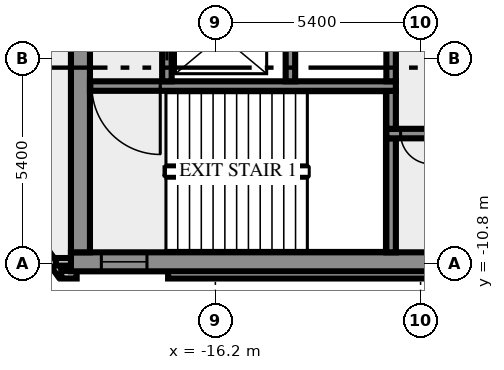
"""IFC4 building model, lengths in metres.
Left out: names, types, materials, properties, quantities, classifications, styles, units other than length and angle.
Written with IfcOpenShell. Run it as: python <this file> out.ifc"""

import sys

from ifc_helpers import new_model, si_unit, direction, frame, frame_2d, origin, place, context, subcontext, project, spatial, rectangle, extrude, element, fill, save


model = new_model("IFC4")
c1 = context("Model", 3, precision=1e-05, world=origin(), true_north=direction((0.0, 1.0)))
c2 = subcontext(c1, "Body", "Model", "MODEL_VIEW")
j1 = project(units=[si_unit("LENGTHUNIT", "METRE"), si_unit("PLANEANGLEUNIT", "RADIAN")], contexts=[c1])
p1 = place(None, origin())
s1 = spatial("IfcSite", under=j1, at=p1, CompositionType="ELEMENT")
p2 = place(p1, origin())
s2 = spatial("IfcBuilding", under=s1, at=p2, CompositionType="ELEMENT")
p3 = place(p2, frame((0.0, 0.0, 289.0)))
s3 = spatial("IfcBuildingStorey", under=s2, at=p3, CompositionType="ELEMENT", Elevation=289.0)
p4 = place(p3, frame((-21.833, -8.909, 0.0), z_axis=(0.0, 0.0, 1.0), x_axis=(0.587766567315, -0.809030569476, 0.0)))
e1 = element("IfcWall", 1, at=p4, inside=s3, PredefinedType="SOLIDWALL", context=c2, shape_type="SweptSolid", body=[
    extrude(rectangle(XDim=2.688, YDim=0.2, at=frame_2d((1.344, 0.0))), origin(), (0.0, 0.0, 1.0), 3.65),
])
p5 = place(p3, frame((-20.256, -11.088, 0.0), z_axis=(0.0, 0.0, 1.0), x_axis=(1.0, 0.0, 0.0)))
e2 = element("IfcWall", 2, at=p5, inside=s3, PredefinedType="SOLIDWALL", context=c2, shape_type="SweptSolid", body=[
    extrude(rectangle(XDim=0.406, YDim=0.2, at=frame_2d((0.203, 0.0))), origin(), (0.0, 0.0, 1.0), 3.65),
])
p6 = place(p3, frame((-17.444, -11.088, 0.0), z_axis=(0.0, 0.0, 1.0), x_axis=(1.0, 0.0, 0.0)))
e3 = element("IfcWall", 3, at=p6, inside=s3, PredefinedType="SOLIDWALL", context=c2, shape_type="SweptSolid", body=[
    extrude(rectangle(XDim=34.888, YDim=0.2, at=frame_2d((17.444, 0.0))), origin(), (0.0, 0.0, 1.0), 3.65),
])
p7 = place(p3, frame((-19.98, -10.75, 0.0), z_axis=(0.0, 0.0, 1.0), x_axis=(-1.0, 0.0, 0.0)))
e4 = element("IfcWall", 4, at=p7, inside=s3, PredefinedType="SOLIDWALL", context=c2, shape_type="SweptSolid", body=[
    extrude(rectangle(XDim=0.417, YDim=0.2, at=frame_2d((0.208, 0.0))), origin(), (0.0, 0.0, 1.0), 3.65),
])
p8 = place(p3, frame((-20.0, -10.75, 0.0), z_axis=(0.0, 0.0, 1.0), x_axis=(1.0, 0.0, 0.0)))
e5 = element("IfcWall", 5, at=p8, inside=s3, PredefinedType="SHEAR", context=c2, shape_type="SweptSolid", body=[
    extrude(rectangle(XDim=40.0, YDim=0.5, at=frame_2d((20.0, 0.0))), origin(), (0.0, 0.0, 1.0), 3.65),
])
p9 = place(p8, frame((0.8, 0.0, 1.0)))
e6 = element("IfcOpeningElement", 6, at=p9, cuts=e5, PredefinedType="OPENING", context=c2, shape_type="SweptSolid", body=[
    extrude(rectangle(XDim=1.2, YDim=1.2, at=frame_2d((0.6, 0.6))), frame((0.0, 0.26, 0.0), z_axis=(0.0, -1.0, 0.0), x_axis=(1.0, 0.0, 0.0)), (0.0, 0.0, 1.0), 0.52),
])
p10 = place(p8, frame((38.0, 0.0, 1.0)))
e7 = element("IfcOpeningElement", 7, at=p10, cuts=e5, PredefinedType="OPENING", context=c2, shape_type="SweptSolid", body=[
    extrude(rectangle(XDim=1.2, YDim=1.2, at=frame_2d((0.6, 0.6))), frame((0.0, 0.26, 0.0), z_axis=(0.0, -1.0, 0.0), x_axis=(1.0, 0.0, 0.0)), (0.0, 0.0, 1.0), 0.52),
])
p11 = place(p3, frame((-19.75, -10.5, 0.0), z_axis=(0.0, 0.0, 1.0), x_axis=(0.0, 1.0, 0.0)))
e8 = element("IfcWall", 8, at=p11, inside=s3, PredefinedType="SHEAR", context=c2, shape_type="SweptSolid", body=[
    extrude(rectangle(XDim=8.8, YDim=0.5, at=frame_2d((4.4, 0.0))), origin(), (0.0, 0.0, 1.0), 3.65),
])
p12 = place(p3, frame((-11.575, -10.5, 0.0), z_axis=(0.0, 0.0, 1.0), x_axis=(0.0, 1.0, 0.0)))
e9 = element("IfcWall", 9, at=p12, inside=s3, PredefinedType="SHEAR", context=c2, shape_type="SweptSolid", body=[
    extrude(rectangle(XDim=3.0, YDim=0.25, at=frame_2d((1.5, 0.0))), origin(), (0.0, 0.0, 1.0), 3.65),
])
p13 = place(p3, frame((11.7, -7.375, 0.0), z_axis=(0.0, 0.0, 1.0), x_axis=(-1.0, 0.0, 0.0)))
e10 = element("IfcWall", 10, at=p13, inside=s3, PredefinedType="SHEAR", context=c2, shape_type="SweptSolid", body=[
    extrude(rectangle(XDim=23.4, YDim=0.25, at=frame_2d((11.7, 0.0))), origin(), (0.0, 0.0, 1.0), 3.65),
])
p14 = place(p13, frame((22.225, 0.0, 0.0)))
e11 = element("IfcOpeningElement", 11, at=p14, cuts=e10, PredefinedType="OPENING", context=c2, shape_type="SweptSolid", body=[
    extrude(rectangle(XDim=0.8, YDim=2.1, at=frame_2d((0.4, 1.05))), frame((0.0, 0.135, 0.0), z_axis=(0.0, -1.0, 0.0), x_axis=(1.0, 0.0, 0.0)), (0.0, 0.0, 1.0), 0.27),
])
p15 = place(p13, frame((20.2, 0.0, 0.0)))
e12 = element("IfcOpeningElement", 12, at=p15, cuts=e10, PredefinedType="OPENING", context=c2, shape_type="SweptSolid", body=[
    extrude(rectangle(XDim=1.1, YDim=2.1, at=frame_2d((0.55, 1.05))), frame((0.0, 0.135, 0.0), z_axis=(0.0, -1.0, 0.0), x_axis=(1.0, 0.0, 0.0)), (0.0, 0.0, 1.0), 0.27),
])
p16 = place(p13, frame((17.7, 0.0, 0.0)))
e13 = element("IfcOpeningElement", 13, at=p16, cuts=e10, PredefinedType="OPENING", context=c2, shape_type="SweptSolid", body=[
    extrude(rectangle(XDim=1.1, YDim=2.1, at=frame_2d((0.55, 1.05))), frame((0.0, 0.135, 0.0), z_axis=(0.0, -1.0, 0.0), x_axis=(1.0, 0.0, 0.0)), (0.0, 0.0, 1.0), 0.27),
])
p17 = place(p13, frame((15.975, 0.0, 0.0)))
e14 = element("IfcOpeningElement", 14, at=p17, cuts=e10, PredefinedType="OPENING", context=c2, shape_type="SweptSolid", body=[
    extrude(rectangle(XDim=0.8, YDim=2.1, at=frame_2d((0.4, 1.05))), frame((0.0, 0.135, 0.0), z_axis=(0.0, -1.0, 0.0), x_axis=(1.0, 0.0, 0.0)), (0.0, 0.0, 1.0), 0.27),
])
p18 = place(p13, frame((14.5, 0.0, 0.0)))
e15 = element("IfcOpeningElement", 15, at=p18, cuts=e10, PredefinedType="OPENING", context=c2, shape_type="SweptSolid", body=[
    extrude(rectangle(XDim=0.9, YDim=2.1, at=frame_2d((0.45, 1.05))), frame((0.0, 0.135, 0.0), z_axis=(0.0, -1.0, 0.0), x_axis=(1.0, 0.0, 0.0)), (0.0, 0.0, 1.0), 0.27),
])
p19 = place(p13, frame((12.95, 0.0, 0.0)))
e16 = element("IfcOpeningElement", 16, at=p19, cuts=e10, PredefinedType="OPENING", context=c2, shape_type="SweptSolid", body=[
    extrude(rectangle(XDim=0.9, YDim=2.1, at=frame_2d((0.45, 1.05))), frame((0.0, 0.135, 0.0), z_axis=(0.0, -1.0, 0.0), x_axis=(1.0, 0.0, 0.0)), (0.0, 0.0, 1.0), 0.27),
])
p20 = place(p13, frame((11.475, 0.0, 0.0)))
e17 = element("IfcOpeningElement", 17, at=p20, cuts=e10, PredefinedType="OPENING", context=c2, shape_type="SweptSolid", body=[
    extrude(rectangle(XDim=0.9, YDim=2.1, at=frame_2d((0.45, 1.05))), frame((0.0, 0.135, 0.0), z_axis=(0.0, -1.0, 0.0), x_axis=(1.0, 0.0, 0.0)), (0.0, 0.0, 1.0), 0.27),
])
p21 = place(p13, frame((10.45, 0.0, 0.0)))
e18 = element("IfcOpeningElement", 18, at=p21, cuts=e10, PredefinedType="OPENING", context=c2, shape_type="SweptSolid", body=[
    extrude(rectangle(XDim=0.5, YDim=2.1, at=frame_2d((0.25, 1.05))), frame((0.0, 0.135, 0.0), z_axis=(0.0, -1.0, 0.0), x_axis=(1.0, 0.0, 0.0)), (0.0, 0.0, 1.0), 0.27),
])
p22 = place(p13, frame((7.987, 0.0, 0.0)))
e19 = element("IfcOpeningElement", 19, at=p22, cuts=e10, PredefinedType="OPENING", context=c2, shape_type="SweptSolid", body=[
    extrude(rectangle(XDim=0.9, YDim=2.1, at=frame_2d((0.45, 1.05))), frame((0.0, 0.135, 0.0), z_axis=(0.0, -1.0, 0.0), x_axis=(1.0, 0.0, 0.0)), (0.0, 0.0, 1.0), 0.27),
])
p23 = place(p13, frame((3.012, 0.0, 0.0)))
e20 = element("IfcOpeningElement", 20, at=p23, cuts=e10, PredefinedType="OPENING", context=c2, shape_type="SweptSolid", body=[
    extrude(rectangle(XDim=0.9, YDim=2.1, at=frame_2d((0.45, 1.05))), frame((0.0, 0.135, 0.0), z_axis=(0.0, -1.0, 0.0), x_axis=(1.0, 0.0, 0.0)), (0.0, 0.0, 1.0), 0.27),
])
p24 = place(p3, frame((-11.575, -7.25, 0.0), z_axis=(0.0, 0.0, 1.0), x_axis=(0.0, 1.0, 0.0)))
e21 = element("IfcWall", 21, at=p24, inside=s3, PredefinedType="SHEAR", context=c2, shape_type="SweptSolid", body=[
    extrude(rectangle(XDim=1.0, YDim=0.25, at=frame_2d((0.5, 0.0))), origin(), (0.0, 0.0, 1.0), 3.65),
])
p25 = place(p3, frame((-11.45, -6.125, 0.0), z_axis=(0.0, 0.0, 1.0), x_axis=(-1.0, 0.0, 0.0)))
e22 = element("IfcWall", 22, at=p25, inside=s3, PredefinedType="SHEAR", context=c2, shape_type="SweptSolid", body=[
    extrude(rectangle(XDim=8.05, YDim=0.25, at=frame_2d((4.025, 0.0))), origin(), (0.0, 0.0, 1.0), 3.65),
])
p26 = place(p25, frame((6.2, 0.0, 0.0)))
e23 = element("IfcOpeningElement", 23, at=p26, cuts=e22, PredefinedType="OPENING", context=c2, shape_type="SweptSolid", body=[
    extrude(rectangle(XDim=1.8, YDim=2.1, at=frame_2d((0.9, 1.05))), frame((0.0, 0.135, 0.0), z_axis=(0.0, -1.0, 0.0), x_axis=(1.0, 0.0, 0.0)), (0.0, 0.0, 1.0), 0.27),
])
p27 = place(p3, frame((-17.475, -6.0, 0.0), z_axis=(0.0, 0.0, 1.0), x_axis=(0.0, 1.0, 0.0)))
e24 = element("IfcWall", 24, at=p27, inside=s3, PredefinedType="SHEAR", context=c2, shape_type="SweptSolid", body=[
    extrude(rectangle(XDim=4.3, YDim=0.25, at=frame_2d((2.15, 0.0))), origin(), (0.0, 0.0, 1.0), 3.65),
])
p28 = place(p27, frame((0.55, 0.0, 0.0)))
e25 = element("IfcOpeningElement", 25, at=p28, cuts=e24, PredefinedType="OPENING", context=c2, shape_type="SweptSolid", body=[
    extrude(rectangle(XDim=1.3, YDim=2.1, at=frame_2d((0.65, 1.05))), frame((0.0, 0.135, 0.0), z_axis=(0.0, -1.0, 0.0), x_axis=(1.0, 0.0, 0.0)), (0.0, 0.0, 1.0), 0.27),
])
p29 = place(p3, frame((-14.225, -6.0, 0.0), z_axis=(0.0, 0.0, 1.0), x_axis=(0.0, 1.0, 0.0)))
e26 = element("IfcWall", 26, at=p29, inside=s3, PredefinedType="SHEAR", context=c2, shape_type="SweptSolid", body=[
    extrude(rectangle(XDim=4.3, YDim=0.25, at=frame_2d((2.15, 0.0))), origin(), (0.0, 0.0, 1.0), 3.65),
])
p30 = place(p3, frame((-11.575, -6.0, 0.0), z_axis=(0.0, 0.0, 1.0), x_axis=(0.0, 1.0, 0.0)))
e27 = element("IfcWall", 27, at=p30, inside=s3, PredefinedType="SHEAR", context=c2, shape_type="SweptSolid", body=[
    extrude(rectangle(XDim=1.75, YDim=0.25, at=frame_2d((0.875, 0.0))), origin(), (0.0, 0.0, 1.0), 3.65),
])
p31 = place(p9, origin())
e28 = element("IfcWindow", 28, at=p31, inside=s3, PartitioningType="SINGLE_PANEL", PredefinedType="WINDOW", context=c2, shape_type="SweptSolid", body=[
    extrude(rectangle(XDim=1.2, YDim=1.2, at=frame_2d((0.6, 0.6))), frame((0.0, 0.03, 0.0), z_axis=(0.0, -1.0, 0.0), x_axis=(1.0, 0.0, 0.0)), (0.0, 0.0, 1.0), 0.06),
])
fill(e6, e28)
p32 = place(p14, origin())
e29 = element("IfcDoor", 29, at=p32, inside=s3, OperationType="SINGLE_SWING_RIGHT", PredefinedType="DOOR", context=c2, shape_type="SweptSolid", body=[
    extrude(rectangle(XDim=0.8, YDim=2.1, at=frame_2d((0.4, 1.05))), frame((0.0, 0.025, 0.0), z_axis=(0.0, -1.0, 0.0), x_axis=(1.0, 0.0, 0.0)), (0.0, 0.0, 1.0), 0.05),
])
fill(e11, e29)
p33 = place(p26, origin())
e30 = element("IfcDoor", 30, at=p33, inside=s3, OperationType="DOUBLE_DOOR_SINGLE_SWING", PredefinedType="DOOR", context=c2, shape_type="SweptSolid", body=[
    extrude(rectangle(XDim=1.8, YDim=2.1, at=frame_2d((0.9, 1.05))), frame((0.0, 0.025, 0.0), z_axis=(0.0, -1.0, 0.0), x_axis=(1.0, 0.0, 0.0)), (0.0, 0.0, 1.0), 0.05),
])
fill(e23, e30)
p34 = place(p28, origin())
e31 = element("IfcDoor", 31, at=p34, inside=s3, OperationType="DOUBLE_DOOR_SLIDING", PredefinedType="DOOR", context=c2, shape_type="SweptSolid", body=[
    extrude(rectangle(XDim=1.3, YDim=2.1, at=frame_2d((0.65, 1.05))), frame((0.0, 0.025, 0.0), z_axis=(0.0, -1.0, 0.0), x_axis=(1.0, 0.0, 0.0)), (0.0, 0.0, 1.0), 0.05),
])
fill(e25, e31)
save(model, sys.argv[1])
